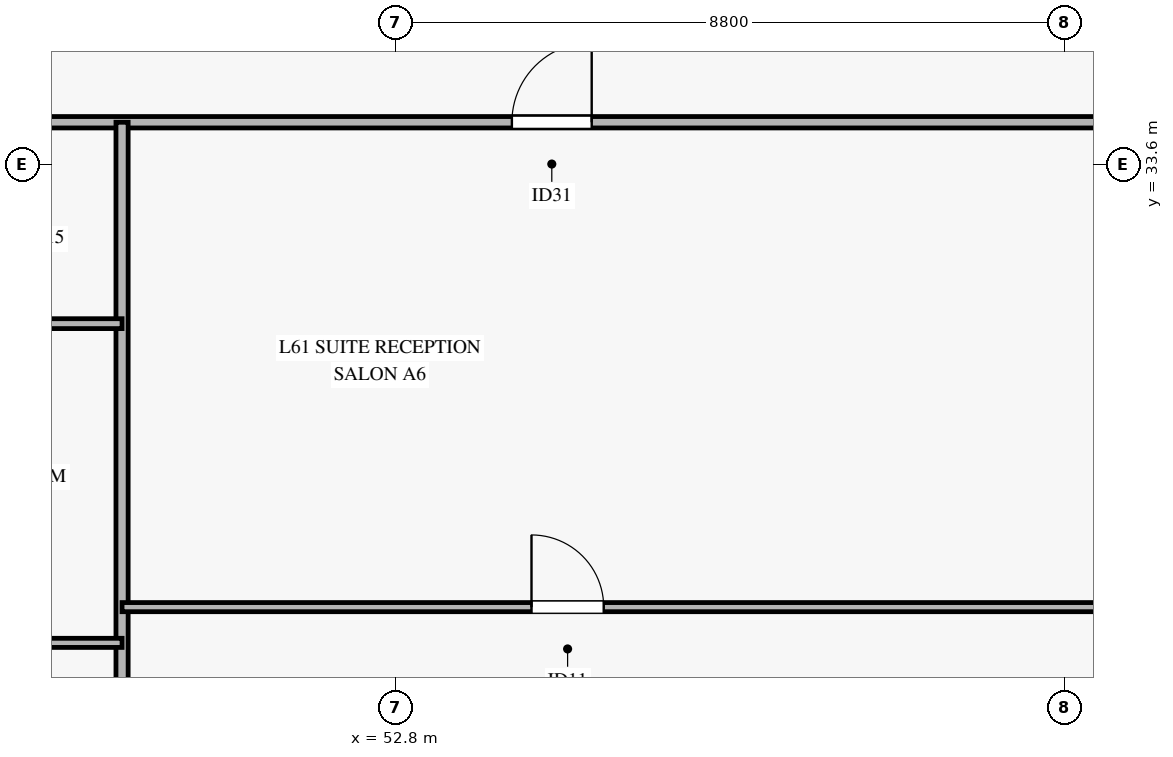
"""IFC4 building model, lengths in metres.
Left out: names, types, materials, properties, quantities, classifications, styles, units other than length and angle.
Written with IfcOpenShell. Run it as: python <this file> out.ifc"""

import sys

from ifc_helpers import new_model, si_unit, direction, frame, frame_2d, origin, place, context, subcontext, project, spatial, rectangle, extrude, source, transform, mapped, element, fill, save


model = new_model("IFC4")
c1 = context("Model", 3, precision=1e-05, world=origin(), true_north=direction((0.0, 1.0)))
c2 = subcontext(c1, "Body", "Model", "MODEL_VIEW")
j1 = project(units=[si_unit("LENGTHUNIT", "METRE"), si_unit("PLANEANGLEUNIT", "RADIAN")], contexts=[c1])
p1 = place(None, origin())
s1 = spatial("IfcSite", under=j1, at=p1, CompositionType="ELEMENT")
p2 = place(p1, origin())
s2 = spatial("IfcBuilding", under=s1, at=p2, CompositionType="ELEMENT")
p3 = place(p2, frame((0.0, 0.0, 241.7)))
s3 = spatial("IfcBuildingStorey", under=s2, at=p3, CompositionType="ELEMENT", Elevation=241.7)
p4 = place(p3, frame((7.948, 34.15, 0.0), z_axis=(0.0, 0.0, 1.0), x_axis=(1.0, 0.0, 0.0)))
e1 = element("IfcWall", 1, at=p4, inside=s3, PredefinedType="PARTITIONING", context=c2, shape_type="SweptSolid", body=[
    extrude(rectangle(XDim=54.504, YDim=0.15, at=frame_2d((27.252, 0.0))), origin(), (0.0, 0.0, 1.0), 2.47),
])
p5 = place(p4, frame((5.785, 0.0, 0.0)))
e2 = element("IfcOpeningElement", 2, at=p5, cuts=e1, PredefinedType="OPENING", context=c2, shape_type="SweptSolid", body=[
    extrude(rectangle(XDim=1.05, YDim=2.15, at=frame_2d((0.525, 1.075))), frame((0.0, 0.085, 0.0), z_axis=(0.0, -1.0, 0.0), x_axis=(1.0, 0.0, 0.0)), (0.0, 0.0, 1.0), 0.17),
])
p6 = place(p4, frame((16.977, 0.0, 0.0)))
e3 = element("IfcOpeningElement", 3, at=p6, cuts=e1, PredefinedType="OPENING", context=c2, shape_type="SweptSolid", body=[
    extrude(rectangle(XDim=1.05, YDim=2.15, at=frame_2d((0.525, 1.075))), frame((0.0, 0.085, 0.0), z_axis=(0.0, -1.0, 0.0), x_axis=(1.0, 0.0, 0.0)), (0.0, 0.0, 1.0), 0.17),
])
p7 = place(p4, frame((23.427, 0.0, 0.0)))
e4 = element("IfcOpeningElement", 4, at=p7, cuts=e1, PredefinedType="OPENING", context=c2, shape_type="SweptSolid", body=[
    extrude(rectangle(XDim=1.05, YDim=2.15, at=frame_2d((0.525, 1.075))), frame((0.0, 0.085, 0.0), z_axis=(0.0, -1.0, 0.0), x_axis=(1.0, 0.0, 0.0)), (0.0, 0.0, 1.0), 0.17),
])
p8 = place(p4, frame((29.827, 0.0, 0.0)))
e5 = element("IfcOpeningElement", 5, at=p8, cuts=e1, PredefinedType="OPENING", context=c2, shape_type="SweptSolid", body=[
    extrude(rectangle(XDim=1.05, YDim=2.15, at=frame_2d((0.525, 1.075))), frame((0.0, 0.085, 0.0), z_axis=(0.0, -1.0, 0.0), x_axis=(1.0, 0.0, 0.0)), (0.0, 0.0, 1.0), 0.17),
])
p9 = place(p4, frame((36.927, 0.0, 0.0)))
e6 = element("IfcOpeningElement", 6, at=p9, cuts=e1, PredefinedType="OPENING", context=c2, shape_type="SweptSolid", body=[
    extrude(rectangle(XDim=1.05, YDim=2.15, at=frame_2d((0.525, 1.075))), frame((0.0, 0.085, 0.0), z_axis=(0.0, -1.0, 0.0), x_axis=(1.0, 0.0, 0.0)), (0.0, 0.0, 1.0), 0.17),
])
p10 = place(p4, frame((46.381, 0.0, 0.0)))
e7 = element("IfcOpeningElement", 7, at=p10, cuts=e1, PredefinedType="OPENING", context=c2, shape_type="SweptSolid", body=[
    extrude(rectangle(XDim=1.05, YDim=2.15, at=frame_2d((0.525, 1.075))), frame((0.0, 0.085, 0.0), z_axis=(0.0, -1.0, 0.0), x_axis=(1.0, 0.0, 0.0)), (0.0, 0.0, 1.0), 0.17),
])
p11 = place(p3, frame((49.2, 14.182, 0.0), z_axis=(0.0, 0.0, 1.0), x_axis=(0.0, 1.0, 0.0)))
e8 = element("IfcWall", 8, at=p11, inside=s3, PredefinedType="PARTITIONING", context=c2, shape_type="SweptSolid", body=[
    extrude(rectangle(XDim=19.968, YDim=0.16, at=frame_2d((9.984, 0.0))), origin(), (0.0, 0.0, 1.0), 2.77),
])
p12 = place(p3, frame((47.21, 31.5, 0.0), z_axis=(0.0, 0.0, 1.0), x_axis=(1.0, 0.0, 0.0)))
e9 = element("IfcWall", 9, at=p12, inside=s3, PredefinedType="PARTITIONING", context=c2, shape_type="SweptSolid", body=[
    extrude(rectangle(XDim=1.99, YDim=0.13, at=frame_2d((0.995, 0.0))), origin(), (0.0, 0.0, 1.0), 3.185),
])
p13 = place(p3, frame((45.3, 27.3, 0.0), z_axis=(0.0, 0.0, 1.0), x_axis=(1.0, 0.0, 0.0)))
e10 = element("IfcWall", 10, at=p13, inside=s3, PredefinedType="PARTITIONING", context=c2, shape_type="SweptSolid", body=[
    extrude(rectangle(XDim=3.9, YDim=0.12, at=frame_2d((1.95, 0.0))), origin(), (0.0, 0.0, 1.0), 3.185),
])
p14 = place(p3, frame((49.2, 27.77, 0.0), z_axis=(0.0, 0.0, 1.0), x_axis=(1.0, 0.0, 0.0)))
e11 = element("IfcWall", 11, at=p14, inside=s3, PredefinedType="PARTITIONING", context=c2, shape_type="SweptSolid", body=[
    extrude(rectangle(XDim=13.252, YDim=0.12, at=frame_2d((6.626, 0.0))), origin(), (0.0, 0.0, 1.0), 2.47),
])
p15 = place(p14, frame((5.387, 0.0, 0.0)))
e12 = element("IfcOpeningElement", 12, at=p15, cuts=e11, PredefinedType="OPENING", context=c2, shape_type="SweptSolid", body=[
    extrude(rectangle(XDim=0.95, YDim=2.1, at=frame_2d((0.475, 1.05))), frame((0.0, 0.07, 0.0), z_axis=(0.0, -1.0, 0.0), x_axis=(1.0, 0.0, 0.0)), (0.0, 0.0, 1.0), 0.14),
])
m1 = source(origin(), c2, "Body", "SweptSolid", [
    extrude(rectangle(XDim=1.05, YDim=2.15, at=frame_2d((0.525, 1.075))), frame((0.0, 0.025, 0.0), z_axis=(0.0, -1.0, 0.0), x_axis=(1.0, 0.0, 0.0)), (0.0, 0.0, 1.0), 0.05),
])
p16 = place(p10, origin())
e13 = element("IfcDoor", 13, at=p16, inside=s3, OperationType="SINGLE_SWING_RIGHT", PredefinedType="DOOR", context=c2, shape_type="MappedRepresentation", body=[
    mapped(m1, transform((0.0, 0.0, 0.0), x_axis=(1.0, 0.0, 0.0), y_axis=(0.0, 1.0, 0.0), z_axis=(0.0, 0.0, 1.0), scale=1.0)),
])
fill(e7, e13)
m2 = source(origin(), c2, "Body", "SweptSolid", [
    extrude(rectangle(XDim=0.95, YDim=2.1, at=frame_2d((0.475, 1.05))), frame((0.0, 0.025, 0.0), z_axis=(0.0, -1.0, 0.0), x_axis=(1.0, 0.0, 0.0)), (0.0, 0.0, 1.0), 0.05),
])
p17 = place(p15, origin())
e14 = element("IfcDoor", 14, at=p17, inside=s3, OperationType="SINGLE_SWING_LEFT", PredefinedType="DOOR", context=c2, shape_type="MappedRepresentation", body=[
    mapped(m2, transform((0.0, 0.0, 0.0), x_axis=(1.0, 0.0, 0.0), y_axis=(0.0, 1.0, 0.0), z_axis=(0.0, 0.0, 1.0), scale=1.0)),
])
fill(e12, e14)
save(model, sys.argv[1])
